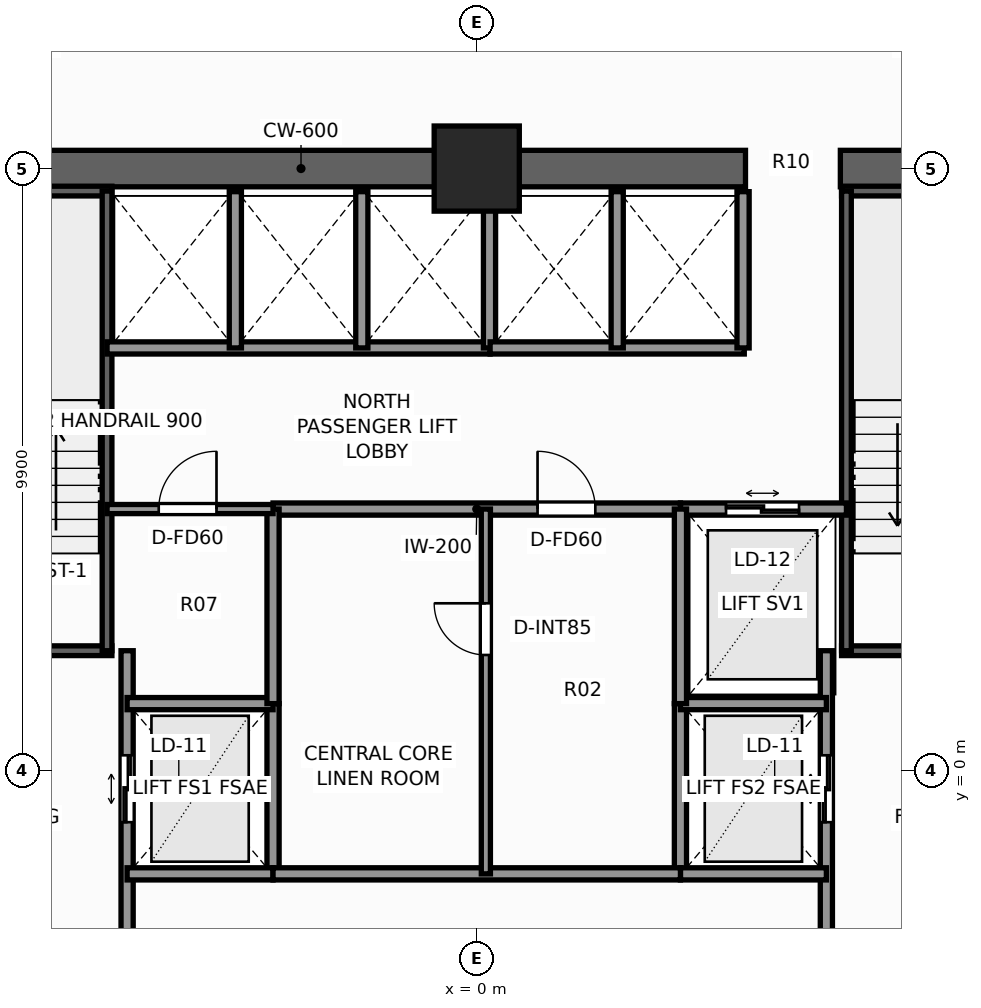
"""IFC4 building model, lengths in metres.
Left out: names, types, materials, properties, quantities, classifications, styles, units other than length and angle.
Written with IfcOpenShell. Run it as: python <this file> out.ifc"""

import sys

from ifc_helpers import new_model, si_unit, direction, frame, frame_2d, origin, origin_2d, place, context, subcontext, project, spatial, rectangle, extrude, element, fill, save


model = new_model("IFC4")
c1 = context("Model", 3, precision=1e-05, world=origin(), true_north=direction((0.0, 1.0)))
c2 = subcontext(c1, "Body", "Model", "MODEL_VIEW")
j1 = project(units=[si_unit("LENGTHUNIT", "METRE"), si_unit("PLANEANGLEUNIT", "RADIAN")], contexts=[c1])
p1 = place(None, origin())
s1 = spatial("IfcSite", under=j1, at=p1, CompositionType="ELEMENT")
p2 = place(p1, origin())
s2 = spatial("IfcBuilding", under=s1, at=p2, CompositionType="ELEMENT")
p3 = place(p2, frame((0.0, 0.0, 72.2)))
s3 = spatial("IfcBuildingStorey", under=s2, at=p3, CompositionType="ELEMENT", Elevation=72.2)
p4 = place(p3, frame((-10.2, 9.9, 0.0), z_axis=(0.0, 0.0, 1.0), x_axis=(1.0, 0.0, 0.0)))
e1 = element("IfcWall", 1, at=p4, inside=s3, PredefinedType="SHEAR", context=c2, shape_type="SweptSolid", body=[
    extrude(rectangle(XDim=14.62, YDim=0.6, at=frame_2d((7.31, 0.0))), origin(), (0.0, 0.0, 1.0), 3.3),
])
p5 = place(p3, frame((5.98, 9.9, 0.0), z_axis=(0.0, 0.0, 1.0), x_axis=(1.0, 0.0, 0.0)))
e2 = element("IfcWall", 2, at=p5, inside=s3, PredefinedType="SHEAR", context=c2, shape_type="SweptSolid", body=[
    extrude(rectangle(XDim=4.22, YDim=0.6, at=frame_2d((2.11, 0.0))), origin(), (0.0, 0.0, 1.0), 3.3),
])
p6 = place(p3, frame((0.0, 9.9, 0.0), z_axis=(0.0, 0.0, 1.0), x_axis=(1.0, 0.0, 0.0)))
e3 = element("IfcColumn", 3, at=p6, inside=s3, PredefinedType="COLUMN", context=c2, shape_type="SweptSolid", body=[
    extrude(rectangle(XDim=1.4, YDim=1.4, at=origin_2d()), origin(), (0.0, 0.0, 1.0), 3.3),
])
p7 = place(p3, frame((-9.52, 1.97, 0.0), z_axis=(0.0, 0.0, 1.0), x_axis=(1.0, 0.0, 0.0)))
e4 = element("IfcWall", 4, at=p7, inside=s3, PredefinedType="SHEAR", context=c2, shape_type="SweptSolid", body=[
    extrude(rectangle(XDim=3.52, YDim=0.16, at=frame_2d((1.76, 0.0))), origin(), (0.0, 0.0, 1.0), 3.3),
])
p8 = place(p7, frame((1.15, 0.0, 0.0)))
e5 = element("IfcOpeningElement", 5, at=p8, cuts=e4, PredefinedType="OPENING", context=c2, shape_type="SweptSolid", body=[
    extrude(rectangle(XDim=1.1, YDim=2.2, at=frame_2d((0.55, 1.1))), frame((0.0, 0.09, 0.0), z_axis=(0.0, -1.0, 0.0), x_axis=(1.0, 0.0, 0.0)), (0.0, 0.0, 1.0), 0.18),
])
p9 = place(p3, frame((-9.52, 9.53, 0.0), z_axis=(0.0, 0.0, 1.0), x_axis=(1.0, 0.0, 0.0)))
e6 = element("IfcWall", 6, at=p9, inside=s3, PredefinedType="SHEAR", context=c2, shape_type="SweptSolid", body=[
    extrude(rectangle(XDim=3.52, YDim=0.16, at=frame_2d((1.76, 0.0))), origin(), (0.0, 0.0, 1.0), 3.3),
])
p10 = place(p3, frame((-6.08, 1.97, 0.0), z_axis=(0.0, 0.0, 1.0), x_axis=(0.0, 1.0, 0.0)))
e7 = element("IfcWall", 7, at=p10, inside=s3, PredefinedType="SHEAR", context=c2, shape_type="SweptSolid", body=[
    extrude(rectangle(XDim=7.56, YDim=0.16, at=frame_2d((3.78, 0.0))), origin(), (0.0, 0.0, 1.0), 3.3),
])
p11 = place(p3, frame((6.0, 1.97, 0.0), z_axis=(0.0, 0.0, 1.0), x_axis=(1.0, 0.0, 0.0)))
e8 = element("IfcWall", 8, at=p11, inside=s3, PredefinedType="SHEAR", context=c2, shape_type="SweptSolid", body=[
    extrude(rectangle(XDim=3.52, YDim=0.16, at=frame_2d((1.76, 0.0))), origin(), (0.0, 0.0, 1.0), 3.3),
])
p12 = place(p11, frame((1.15, 0.0, 0.0)))
e9 = element("IfcOpeningElement", 9, at=p12, cuts=e8, PredefinedType="OPENING", context=c2, shape_type="SweptSolid", body=[
    extrude(rectangle(XDim=1.1, YDim=2.2, at=frame_2d((0.55, 1.1))), frame((0.0, 0.09, 0.0), z_axis=(0.0, -1.0, 0.0), x_axis=(1.0, 0.0, 0.0)), (0.0, 0.0, 1.0), 0.18),
])
p13 = place(p3, frame((6.0, 9.53, 0.0), z_axis=(0.0, 0.0, 1.0), x_axis=(1.0, 0.0, 0.0)))
e10 = element("IfcWall", 10, at=p13, inside=s3, PredefinedType="SHEAR", context=c2, shape_type="SweptSolid", body=[
    extrude(rectangle(XDim=3.52, YDim=0.16, at=frame_2d((1.76, 0.0))), origin(), (0.0, 0.0, 1.0), 3.3),
])
p14 = place(p3, frame((6.08, 1.97, 0.0), z_axis=(0.0, 0.0, 1.0), x_axis=(0.0, 1.0, 0.0)))
e11 = element("IfcWall", 11, at=p14, inside=s3, PredefinedType="SHEAR", context=c2, shape_type="SweptSolid", body=[
    extrude(rectangle(XDim=7.56, YDim=0.16, at=frame_2d((3.78, 0.0))), origin(), (0.0, 0.0, 1.0), 3.3),
])
p15 = place(p3, frame((-5.75, -3.6, 0.0), z_axis=(0.0, 0.0, 1.0), x_axis=(0.0, 1.0, 0.0)))
e12 = element("IfcWall", 12, at=p15, inside=s3, PredefinedType="SOLIDWALL", context=c2, shape_type="SweptSolid", body=[
    extrude(rectangle(XDim=5.57, YDim=0.2, at=frame_2d((2.785, 0.0))), origin(), (0.0, 0.0, 1.0), 3.08),
])
p16 = place(p15, frame((2.75, 0.0, 0.0)))
e13 = element("IfcOpeningElement", 13, at=p16, cuts=e12, PredefinedType="OPENING", context=c2, shape_type="SweptSolid", body=[
    extrude(rectangle(XDim=1.1, YDim=2.2, at=frame_2d((0.55, 1.1))), frame((0.0, 0.11, 0.0), z_axis=(0.0, -1.0, 0.0), x_axis=(1.0, 0.0, 0.0)), (0.0, 0.0, 1.0), 0.22),
])
p17 = place(p3, frame((-3.35, -1.7, 0.0), z_axis=(0.0, 0.0, 1.0), x_axis=(0.0, 1.0, 0.0)))
e14 = element("IfcWall", 14, at=p17, inside=s3, PredefinedType="SOLIDWALL", context=c2, shape_type="SweptSolid", body=[
    extrude(rectangle(XDim=2.8, YDim=0.2, at=frame_2d((1.4, 0.0))), origin(), (0.0, 0.0, 1.0), 3.08),
])
for number, where, z_axis, x_axis in (
    (15, (-5.75, -1.7, 0.0), (0.0, 0.0, 1.0), (1.0, 0.0, 0.0)),
    (16, (-5.75, 1.1, 0.0), (0.0, 0.0, 1.0), (1.0, 0.0, 0.0)),
):
    element("IfcWall", number, at=place(p3, frame(where, z_axis=z_axis, x_axis=x_axis)), inside=s3, PredefinedType="SOLIDWALL", context=c2, shape_type="SweptSolid", body=[
        extrude(rectangle(XDim=2.4, YDim=0.2, at=frame_2d((1.2, 0.0))), origin(), (0.0, 0.0, 1.0), 3.08),
    ])
p18 = place(p3, frame((5.75, -3.6, 0.0), z_axis=(0.0, 0.0, 1.0), x_axis=(0.0, 1.0, 0.0)))
e17 = element("IfcWall", 17, at=p18, inside=s3, PredefinedType="SOLIDWALL", context=c2, shape_type="SweptSolid", body=[
    extrude(rectangle(XDim=5.57, YDim=0.2, at=frame_2d((2.785, 0.0))), origin(), (0.0, 0.0, 1.0), 3.08),
])
p19 = place(p18, frame((2.75, 0.0, 0.0)))
e18 = element("IfcOpeningElement", 18, at=p19, cuts=e17, PredefinedType="OPENING", context=c2, shape_type="SweptSolid", body=[
    extrude(rectangle(XDim=1.1, YDim=2.2, at=frame_2d((0.55, 1.1))), frame((0.0, 0.11, 0.0), z_axis=(0.0, -1.0, 0.0), x_axis=(1.0, 0.0, 0.0)), (0.0, 0.0, 1.0), 0.22),
])
p20 = place(p3, frame((3.35, -1.7, 0.0), z_axis=(0.0, 0.0, 1.0), x_axis=(0.0, 1.0, 0.0)))
e19 = element("IfcWall", 19, at=p20, inside=s3, PredefinedType="SOLIDWALL", context=c2, shape_type="SweptSolid", body=[
    extrude(rectangle(XDim=2.8, YDim=0.2, at=frame_2d((1.4, 0.0))), origin(), (0.0, 0.0, 1.0), 3.08),
])
for number, where, z_axis, x_axis in (
    (20, (3.35, -1.7, 0.0), (0.0, 0.0, 1.0), (1.0, 0.0, 0.0)),
    (21, (3.35, 1.1, 0.0), (0.0, 0.0, 1.0), (1.0, 0.0, 0.0)),
):
    element("IfcWall", number, at=place(p3, frame(where, z_axis=z_axis, x_axis=x_axis)), inside=s3, PredefinedType="SOLIDWALL", context=c2, shape_type="SweptSolid", body=[
        extrude(rectangle(XDim=2.4, YDim=0.2, at=frame_2d((1.2, 0.0))), origin(), (0.0, 0.0, 1.0), 3.08),
    ])
p21 = place(p3, frame((3.35, 4.3, 0.0), z_axis=(0.0, 0.0, 1.0), x_axis=(1.0, 0.0, 0.0)))
e22 = element("IfcWall", 22, at=p21, inside=s3, PredefinedType="SOLIDWALL", context=c2, shape_type="SweptSolid", body=[
    extrude(rectangle(XDim=2.73, YDim=0.2, at=frame_2d((1.365, 0.0))), origin(), (0.0, 0.0, 1.0), 3.08),
])
p22 = place(p21, frame((0.75, 0.0, 0.0)))
e23 = element("IfcOpeningElement", 23, at=p22, cuts=e22, PredefinedType="OPENING", context=c2, shape_type="SweptSolid", body=[
    extrude(rectangle(XDim=1.2, YDim=2.25, at=frame_2d((0.6, 1.125))), frame((0.0, 0.11, 0.0), z_axis=(0.0, -1.0, 0.0), x_axis=(1.0, 0.0, 0.0)), (0.0, 0.0, 1.0), 0.22),
])
p23 = place(p3, frame((-6.08, 6.95, 0.0), z_axis=(0.0, 0.0, 1.0), x_axis=(1.0, 0.0, 0.0)))
e24 = element("IfcWall", 24, at=p23, inside=s3, PredefinedType="SOLIDWALL", context=c2, shape_type="SweptSolid", body=[
    extrude(rectangle(XDim=6.3, YDim=0.2, at=frame_2d((3.15, 0.0))), origin(), (0.0, 0.0, 1.0), 3.08),
])
for number, where, z_axis, x_axis in (
    (25, (-3.97, 6.95, 0.0), (0.0, 0.0, 1.0), (0.0, 1.0, 0.0)),
    (26, (-1.89, 6.95, 0.0), (0.0, 0.0, 1.0), (0.0, 1.0, 0.0)),
    (27, (0.21, 6.95, 0.0), (0.0, 0.0, 1.0), (0.0, 1.0, 0.0)),
):
    element("IfcWall", number, at=place(p3, frame(where, z_axis=z_axis, x_axis=x_axis)), inside=s3, PredefinedType="SOLIDWALL", context=c2, shape_type="SweptSolid", body=[
        extrude(rectangle(XDim=2.57, YDim=0.2, at=frame_2d((1.285, 0.0))), origin(), (0.0, 0.0, 1.0), 3.08),
    ])
p24 = place(p3, frame((0.22, 6.95, 0.0), z_axis=(0.0, 0.0, 1.0), x_axis=(1.0, 0.0, 0.0)))
e28 = element("IfcWall", 28, at=p24, inside=s3, PredefinedType="SOLIDWALL", context=c2, shape_type="SweptSolid", body=[
    extrude(rectangle(XDim=4.18, YDim=0.2, at=frame_2d((2.09, 0.0))), origin(), (0.0, 0.0, 1.0), 3.08),
])
for number, where, z_axis, x_axis in (
    (29, (4.38, 6.95, 0.0), (0.0, 0.0, 1.0), (0.0, 1.0, 0.0)),
    (30, (2.31, 6.95, 0.0), (0.0, 0.0, 1.0), (0.0, 1.0, 0.0)),
):
    element("IfcWall", number, at=place(p3, frame(where, z_axis=z_axis, x_axis=x_axis)), inside=s3, PredefinedType="SOLIDWALL", context=c2, shape_type="SweptSolid", body=[
        extrude(rectangle(XDim=2.57, YDim=0.2, at=frame_2d((1.285, 0.0))), origin(), (0.0, 0.0, 1.0), 3.08),
    ])
p25 = place(p3, frame((-3.35, 4.3, 0.0), z_axis=(0.0, 0.0, 1.0), x_axis=(1.0, 0.0, 0.0)))
e31 = element("IfcWall", 31, at=p25, inside=s3, PredefinedType="SOLIDWALL", context=c2, shape_type="SweptSolid", body=[
    extrude(rectangle(XDim=6.7, YDim=0.2, at=frame_2d((3.35, 0.0))), origin(), (0.0, 0.0, 1.0), 3.08),
])
p26 = place(p25, frame((4.35, 0.0, 0.0)))
e32 = element("IfcOpeningElement", 32, at=p26, cuts=e31, PredefinedType="OPENING", context=c2, shape_type="SweptSolid", body=[
    extrude(rectangle(XDim=0.95, YDim=2.06, at=frame_2d((0.475, 1.03))), frame((0.0, 0.11, 0.0), z_axis=(0.0, -1.0, 0.0), x_axis=(1.0, 0.0, 0.0)), (0.0, 0.0, 1.0), 0.22),
])
p27 = place(p3, frame((-3.35, -1.7, 0.0), z_axis=(0.0, 0.0, 1.0), x_axis=(1.0, 0.0, 0.0)))
e33 = element("IfcWall", 33, at=p27, inside=s3, PredefinedType="SOLIDWALL", context=c2, shape_type="SweptSolid", body=[
    extrude(rectangle(XDim=6.7, YDim=0.2, at=frame_2d((3.35, 0.0))), origin(), (0.0, 0.0, 1.0), 3.08),
])
for number, where, z_axis, x_axis in (
    (34, (-3.35, 1.1, 0.0), (0.0, 0.0, 1.0), (0.0, 1.0, 0.0)),
    (35, (3.35, 1.1, 0.0), (0.0, 0.0, 1.0), (0.0, 1.0, 0.0)),
):
    element("IfcWall", number, at=place(p3, frame(where, z_axis=z_axis, x_axis=x_axis)), inside=s3, PredefinedType="SOLIDWALL", context=c2, shape_type="SweptSolid", body=[
        extrude(rectangle(XDim=3.2, YDim=0.2, at=frame_2d((1.6, 0.0))), origin(), (0.0, 0.0, 1.0), 3.08),
    ])
p28 = place(p3, frame((0.15, -1.7, 0.0), z_axis=(0.0, 0.0, 1.0), x_axis=(0.0, 1.0, 0.0)))
e36 = element("IfcWall", 36, at=p28, inside=s3, PredefinedType="PARTITIONING", context=c2, shape_type="SweptSolid", body=[
    extrude(rectangle(XDim=6.0, YDim=0.15, at=frame_2d((3.0, 0.0))), origin(), (0.0, 0.0, 1.0), 3.08),
])
p29 = place(p28, frame((3.6, 0.0, 0.0)))
e37 = element("IfcOpeningElement", 37, at=p29, cuts=e36, PredefinedType="OPENING", context=c2, shape_type="SweptSolid", body=[
    extrude(rectangle(XDim=0.85, YDim=2.03, at=frame_2d((0.425, 1.015))), frame((0.0, 0.085, 0.0), z_axis=(0.0, -1.0, 0.0), x_axis=(1.0, 0.0, 0.0)), (0.0, 0.0, 1.0), 0.17),
])
p30 = place(p3, frame((-6.08, 4.3, 0.0), z_axis=(0.0, 0.0, 1.0), x_axis=(1.0, 0.0, 0.0)))
e38 = element("IfcWall", 38, at=p30, inside=s3, PredefinedType="PARTITIONING", context=c2, shape_type="SweptSolid", body=[
    extrude(rectangle(XDim=2.73, YDim=0.15, at=frame_2d((1.365, 0.0))), origin(), (0.0, 0.0, 1.0), 3.08),
])
p31 = place(p30, frame((0.85, 0.0, 0.0)))
e39 = element("IfcOpeningElement", 39, at=p31, cuts=e38, PredefinedType="OPENING", context=c2, shape_type="SweptSolid", body=[
    extrude(rectangle(XDim=0.95, YDim=2.06, at=frame_2d((0.475, 1.03))), frame((0.0, 0.085, 0.0), z_axis=(0.0, -1.0, 0.0), x_axis=(1.0, 0.0, 0.0)), (0.0, 0.0, 1.0), 0.17),
])
p32 = place(p16, origin())
e40 = element("IfcDoor", 40, at=p32, inside=s3, OperationType="DOUBLE_DOOR_SLIDING", PredefinedType="DOOR", context=c2, shape_type="SweptSolid", body=[
    extrude(rectangle(XDim=1.1, YDim=2.2, at=frame_2d((0.55, 1.1))), frame((0.0, 0.025, 0.0), z_axis=(0.0, -1.0, 0.0), x_axis=(1.0, 0.0, 0.0)), (0.0, 0.0, 1.0), 0.05),
])
fill(e13, e40)
p33 = place(p19, origin())
e41 = element("IfcDoor", 41, at=p33, inside=s3, OperationType="DOUBLE_DOOR_SLIDING", PredefinedType="DOOR", context=c2, shape_type="SweptSolid", body=[
    extrude(rectangle(XDim=1.1, YDim=2.2, at=frame_2d((0.55, 1.1))), frame((0.0, 0.025, 0.0), z_axis=(0.0, -1.0, 0.0), x_axis=(1.0, 0.0, 0.0)), (0.0, 0.0, 1.0), 0.05),
])
fill(e18, e41)
p34 = place(p22, origin())
e42 = element("IfcDoor", 42, at=p34, inside=s3, OperationType="DOUBLE_DOOR_SLIDING", PredefinedType="DOOR", context=c2, shape_type="SweptSolid", body=[
    extrude(rectangle(XDim=1.2, YDim=2.25, at=frame_2d((0.6, 1.125))), frame((0.0, 0.025, 0.0), z_axis=(0.0, -1.0, 0.0), x_axis=(1.0, 0.0, 0.0)), (0.0, 0.0, 1.0), 0.05),
])
fill(e23, e42)
p35 = place(p26, origin())
e43 = element("IfcDoor", 43, at=p35, inside=s3, OperationType="SINGLE_SWING_LEFT", PredefinedType="DOOR", context=c2, shape_type="SweptSolid", body=[
    extrude(rectangle(XDim=0.95, YDim=2.06, at=frame_2d((0.475, 1.03))), frame((0.0, 0.025, 0.0), z_axis=(0.0, -1.0, 0.0), x_axis=(1.0, 0.0, 0.0)), (0.0, 0.0, 1.0), 0.05),
])
fill(e32, e43)
p36 = place(p29, origin())
e44 = element("IfcDoor", 44, at=p36, inside=s3, OperationType="SINGLE_SWING_RIGHT", PredefinedType="DOOR", context=c2, shape_type="SweptSolid", body=[
    extrude(rectangle(XDim=0.85, YDim=2.03, at=frame_2d((0.425, 1.015))), frame((0.0, 0.025, 0.0), z_axis=(0.0, -1.0, 0.0), x_axis=(1.0, 0.0, 0.0)), (0.0, 0.0, 1.0), 0.05),
])
fill(e37, e44)
p37 = place(p31, origin())
e45 = element("IfcDoor", 45, at=p37, inside=s3, OperationType="SINGLE_SWING_RIGHT", PredefinedType="DOOR", context=c2, shape_type="SweptSolid", body=[
    extrude(rectangle(XDim=0.95, YDim=2.06, at=frame_2d((0.475, 1.03))), frame((0.0, 0.025, 0.0), z_axis=(0.0, -1.0, 0.0), x_axis=(1.0, 0.0, 0.0)), (0.0, 0.0, 1.0), 0.05),
])
fill(e39, e45)
save(model, sys.argv[1])
